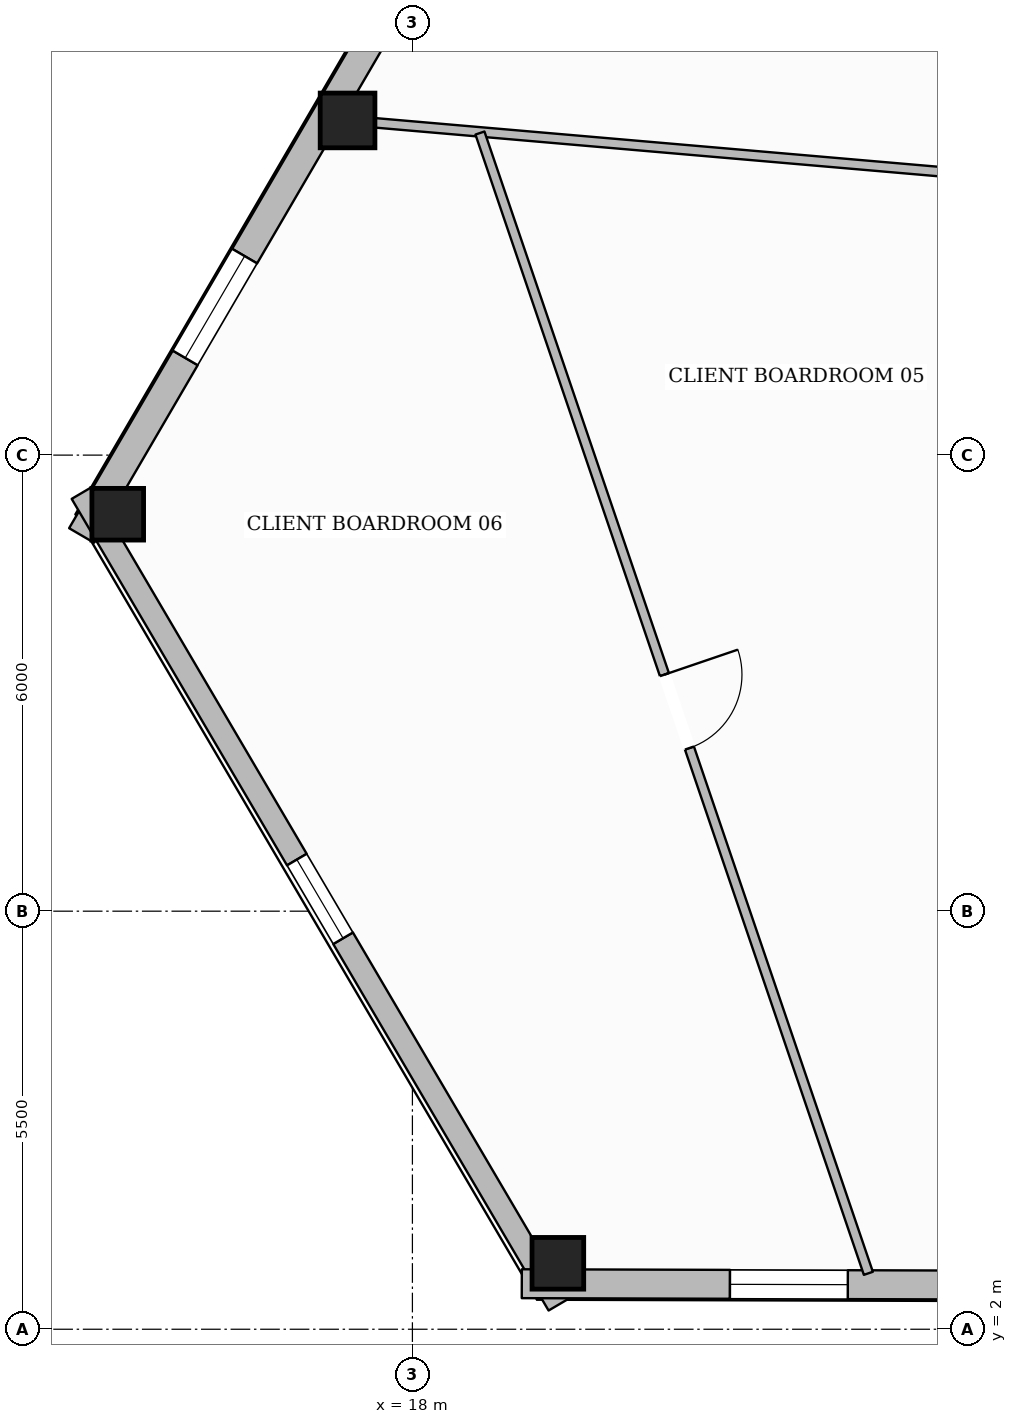
"""IFC4 building model, lengths in metres.
Left out: names, types, materials, properties, quantities, classifications, styles, units other than length and angle.
Written with IfcOpenShell. Run it as: python <this file> out.ifc"""

import sys

from ifc_helpers import new_model, si_unit, direction, frame, frame_2d, origin, origin_2d, place, context, subcontext, project, spatial, rectangle, hollow_rectangle, extrude, element, fill, save


model = new_model("IFC4")
c1 = context("Model", 3, precision=1e-05, world=origin(), true_north=direction((0.0, 1.0)))
c2 = subcontext(c1, "Body", "Model", "MODEL_VIEW")
j1 = project(units=[si_unit("LENGTHUNIT", "METRE"), si_unit("PLANEANGLEUNIT", "RADIAN")], contexts=[c1])
p1 = place(None, origin())
s1 = spatial("IfcSite", under=j1, at=p1, CompositionType="ELEMENT")
p2 = place(p1, origin())
s2 = spatial("IfcBuilding", under=s1, at=p2, CompositionType="ELEMENT")
p3 = place(p2, frame((0.0, 0.0, 127.85)))
s3 = spatial("IfcBuildingStorey", under=s2, at=p3, CompositionType="ELEMENT", Elevation=127.85)
p4 = place(p3, frame((17.147, 17.903, 0.0), z_axis=(0.0, 0.0, 1.0), x_axis=(1.0, 0.0, 0.0)))
e1 = element("IfcColumn", 1, at=p4, inside=s3, PredefinedType="COLUMN", context=c2, shape_type="SweptSolid", body=[
    extrude(hollow_rectangle(XDim=0.72, YDim=0.72, WallThickness=0.032, at=origin_2d()), origin(), (0.0, 0.0, 1.0), 3.6),
])
for number, where, z_axis, x_axis in (
    (2, (14.123, 12.722, 0.0), (0.0, 0.0, 1.0), (1.0, 0.0, 0.0)),
    (3, (19.914, 2.868, 0.0), (0.0, 0.0, 1.0), (1.0, 0.0, 0.0)),
):
    element("IfcColumn", number, at=place(p3, frame(where, z_axis=z_axis, x_axis=x_axis)), inside=s3, PredefinedType="COLUMN", context=c2, shape_type="SweptSolid", body=[
        extrude(hollow_rectangle(XDim=0.68, YDim=0.68, WallThickness=0.03, at=origin_2d()), origin(), (0.0, 0.0, 1.0), 3.6),
    ])
p5 = place(p3, frame((13.648, 12.443, 0.0), z_axis=(0.0, 0.0, 1.0), x_axis=(0.504070270963, 0.863662643589, 0.0)))
e4 = element("IfcWall", 4, at=p5, inside=s3, PredefinedType="STANDARD", context=c2, shape_type="SweptSolid", body=[
    extrude(rectangle(XDim=36.948, YDim=0.38, at=frame_2d((18.474, 0.0))), origin(), (0.0, 0.0, 1.0), 3.059),
])
p6 = place(p5, frame((27.111, 0.0, 0.0)))
e5 = element("IfcOpeningElement", 5, at=p6, cuts=e4, PredefinedType="OPENING", context=c2, shape_type="SweptSolid", body=[
    extrude(rectangle(XDim=1.0, YDim=2.2, at=frame_2d((0.5, 1.1))), frame((0.0, 0.2, 0.0), z_axis=(0.0, -1.0, 0.0), x_axis=(1.0, 0.0, 0.0)), (0.0, 0.0, 1.0), 0.4),
])
p7 = place(p5, frame((32.697, 0.0, 0.65)))
e6 = element("IfcOpeningElement", 6, at=p7, cuts=e4, PredefinedType="OPENING", context=c2, shape_type="SweptSolid", body=[
    extrude(rectangle(XDim=1.55, YDim=1.75, at=frame_2d((0.775, 0.875))), frame((0.0, 0.2, 0.0), z_axis=(0.0, -1.0, 0.0), x_axis=(1.0, 0.0, 0.0)), (0.0, 0.0, 1.0), 0.4),
])
p8 = place(p5, frame((20.7, 0.0, 0.65)))
e7 = element("IfcOpeningElement", 7, at=p8, cuts=e4, PredefinedType="OPENING", context=c2, shape_type="SweptSolid", body=[
    extrude(rectangle(XDim=1.55, YDim=1.75, at=frame_2d((0.775, 0.875))), frame((0.0, 0.2, 0.0), z_axis=(0.0, -1.0, 0.0), x_axis=(1.0, 0.0, 0.0)), (0.0, 0.0, 1.0), 0.4),
])
p9 = place(p5, frame((8.704, 0.0, 0.65)))
e8 = element("IfcOpeningElement", 8, at=p9, cuts=e4, PredefinedType="OPENING", context=c2, shape_type="SweptSolid", body=[
    extrude(rectangle(XDim=1.55, YDim=1.75, at=frame_2d((0.775, 0.875))), frame((0.0, 0.2, 0.0), z_axis=(0.0, -1.0, 0.0), x_axis=(1.0, 0.0, 0.0)), (0.0, 0.0, 1.0), 0.4),
])
p10 = place(p5, frame((2.705, 0.0, 0.65)))
e9 = element("IfcOpeningElement", 9, at=p10, cuts=e4, PredefinedType="OPENING", context=c2, shape_type="SweptSolid", body=[
    extrude(rectangle(XDim=1.55, YDim=1.75, at=frame_2d((0.775, 0.875))), frame((0.0, 0.2, 0.0), z_axis=(0.0, -1.0, 0.0), x_axis=(1.0, 0.0, 0.0)), (0.0, 0.0, 1.0), 0.4),
])
p11 = place(p3, frame((19.921, 2.322, 0.0), z_axis=(0.0, 0.0, 1.0), x_axis=(-0.506600522331, 0.86218090374, 0.0)))
e10 = element("IfcWall", 10, at=p11, inside=s3, PredefinedType="STANDARD", context=c2, shape_type="SweptSolid", body=[
    extrude(rectangle(XDim=12.385, YDim=0.3, at=frame_2d((6.192, 0.0))), origin(), (0.0, 0.0, 1.0), 3.059),
])
p12 = place(p11, frame((5.592, 0.0, 0.65)))
e11 = element("IfcOpeningElement", 11, at=p12, cuts=e10, PredefinedType="OPENING", context=c2, shape_type="SweptSolid", body=[
    extrude(rectangle(XDim=1.2, YDim=1.7, at=frame_2d((0.6, 0.85))), frame((0.0, 0.16, 0.0), z_axis=(0.0, -1.0, 0.0), x_axis=(1.0, 0.0, 0.0)), (0.0, 0.0, 1.0), 0.32),
])
p13 = place(p3, frame((56.872, 2.49, 0.0), z_axis=(0.0, 0.0, 1.0), x_axis=(-0.999995712094, 0.002928445665, 0.0)))
e12 = element("IfcWall", 12, at=p13, inside=s3, PredefinedType="STANDARD", context=c2, shape_type="SweptSolid", body=[
    extrude(rectangle(XDim=37.433, YDim=0.38, at=frame_2d((18.716, 0.0))), origin(), (0.0, 0.0, 1.0), 3.059),
])
p14 = place(p13, frame((33.144, 0.0, 0.65)))
e13 = element("IfcOpeningElement", 13, at=p14, cuts=e12, PredefinedType="OPENING", context=c2, shape_type="SweptSolid", body=[
    extrude(rectangle(XDim=1.55, YDim=1.75, at=frame_2d((0.775, 0.875))), frame((0.0, 0.2, 0.0), z_axis=(0.0, -1.0, 0.0), x_axis=(1.0, 0.0, 0.0)), (0.0, 0.0, 1.0), 0.4),
])
p15 = place(p13, frame((27.063, 0.0, 0.65)))
e14 = element("IfcOpeningElement", 14, at=p15, cuts=e12, PredefinedType="OPENING", context=c2, shape_type="SweptSolid", body=[
    extrude(rectangle(XDim=1.55, YDim=1.75, at=frame_2d((0.775, 0.875))), frame((0.0, 0.2, 0.0), z_axis=(0.0, -1.0, 0.0), x_axis=(1.0, 0.0, 0.0)), (0.0, 0.0, 1.0), 0.4),
])
p16 = place(p13, frame((20.983, 0.0, 0.65)))
e15 = element("IfcOpeningElement", 15, at=p16, cuts=e12, PredefinedType="OPENING", context=c2, shape_type="SweptSolid", body=[
    extrude(rectangle(XDim=1.55, YDim=1.75, at=frame_2d((0.775, 0.875))), frame((0.0, 0.2, 0.0), z_axis=(0.0, -1.0, 0.0), x_axis=(1.0, 0.0, 0.0)), (0.0, 0.0, 1.0), 0.4),
])
p17 = place(p13, frame((8.822, 0.0, 0.65)))
e16 = element("IfcOpeningElement", 16, at=p17, cuts=e12, PredefinedType="OPENING", context=c2, shape_type="SweptSolid", body=[
    extrude(rectangle(XDim=1.55, YDim=1.75, at=frame_2d((0.775, 0.875))), frame((0.0, 0.2, 0.0), z_axis=(0.0, -1.0, 0.0), x_axis=(1.0, 0.0, 0.0)), (0.0, 0.0, 1.0), 0.4),
])
p18 = place(p13, frame((2.742, 0.0, 0.65)))
e17 = element("IfcOpeningElement", 17, at=p18, cuts=e12, PredefinedType="OPENING", context=c2, shape_type="SweptSolid", body=[
    extrude(rectangle(XDim=1.55, YDim=1.75, at=frame_2d((0.775, 0.875))), frame((0.0, 0.2, 0.0), z_axis=(0.0, -1.0, 0.0), x_axis=(1.0, 0.0, 0.0)), (0.0, 0.0, 1.0), 0.4),
])
p19 = place(p3, frame((25.949, 17.142, 0.0), z_axis=(0.0, 0.0, 1.0), x_axis=(-0.996283209421, 0.086138067226, 0.0)))
e18 = element("IfcWall", 18, at=p19, inside=s3, PredefinedType="PARTITIONING", context=c2, shape_type="SweptSolid", body=[
    extrude(rectangle(XDim=8.466, YDim=0.125, at=frame_2d((4.233, 0.0))), origin(), (0.0, 0.0, 1.0), 3.141),
])
p20 = place(p3, frame((18.889, 17.737, 0.0), z_axis=(0.0, 0.0, 1.0), x_axis=(0.322427692705, -0.946594096209, 0.0)))
e19 = element("IfcWall", 19, at=p20, inside=s3, PredefinedType="PARTITIONING", context=c2, shape_type="SweptSolid", body=[
    extrude(rectangle(XDim=15.848, YDim=0.125, at=frame_2d((7.924, 0.0))), origin(), (0.0, 0.0, 1.0), 3.6),
])
p21 = place(p20, frame((7.528, 0.0, 0.0)))
e20 = element("IfcOpeningElement", 20, at=p21, cuts=e19, PredefinedType="OPENING", context=c2, shape_type="SweptSolid", body=[
    extrude(rectangle(XDim=1.02, YDim=2.15, at=frame_2d((0.51, 1.075))), frame((0.0, 0.073, 0.0), z_axis=(0.0, -1.0, 0.0), x_axis=(1.0, 0.0, 0.0)), (0.0, 0.0, 1.0), 0.145),
])
p22 = place(p10, origin())
e21 = element("IfcWindow", 21, at=p22, inside=s3, PartitioningType="SINGLE_PANEL", PredefinedType="WINDOW", context=c2, shape_type="SweptSolid", body=[
    extrude(rectangle(XDim=1.55, YDim=1.75, at=frame_2d((0.775, 0.875))), frame((0.0, 0.03, 0.0), z_axis=(0.0, -1.0, 0.0), x_axis=(1.0, 0.0, 0.0)), (0.0, 0.0, 1.0), 0.06),
])
fill(e9, e21)
p23 = place(p14, origin())
e22 = element("IfcWindow", 22, at=p23, inside=s3, PartitioningType="SINGLE_PANEL", PredefinedType="WINDOW", context=c2, shape_type="SweptSolid", body=[
    extrude(rectangle(XDim=1.55, YDim=1.75, at=frame_2d((0.775, 0.875))), frame((0.0, 0.03, 0.0), z_axis=(0.0, -1.0, 0.0), x_axis=(1.0, 0.0, 0.0)), (0.0, 0.0, 1.0), 0.06),
])
fill(e13, e22)
p24 = place(p12, origin())
e23 = element("IfcWindow", 23, at=p24, inside=s3, PartitioningType="SINGLE_PANEL", PredefinedType="WINDOW", context=c2, shape_type="SweptSolid", body=[
    extrude(rectangle(XDim=1.2, YDim=1.7, at=frame_2d((0.6, 0.85))), frame((0.0, 0.03, 0.0), z_axis=(0.0, -1.0, 0.0), x_axis=(1.0, 0.0, 0.0)), (0.0, 0.0, 1.0), 0.06),
])
fill(e11, e23)
p25 = place(p21, origin())
e24 = element("IfcDoor", 24, at=p25, inside=s3, OperationType="SINGLE_SWING_LEFT", PredefinedType="DOOR", context=c2, shape_type="SweptSolid", body=[
    extrude(rectangle(XDim=1.02, YDim=2.15, at=frame_2d((0.51, 1.075))), frame((0.0, 0.025, 0.0), z_axis=(0.0, -1.0, 0.0), x_axis=(1.0, 0.0, 0.0)), (0.0, 0.0, 1.0), 0.05),
])
fill(e20, e24)
save(model, sys.argv[1])
